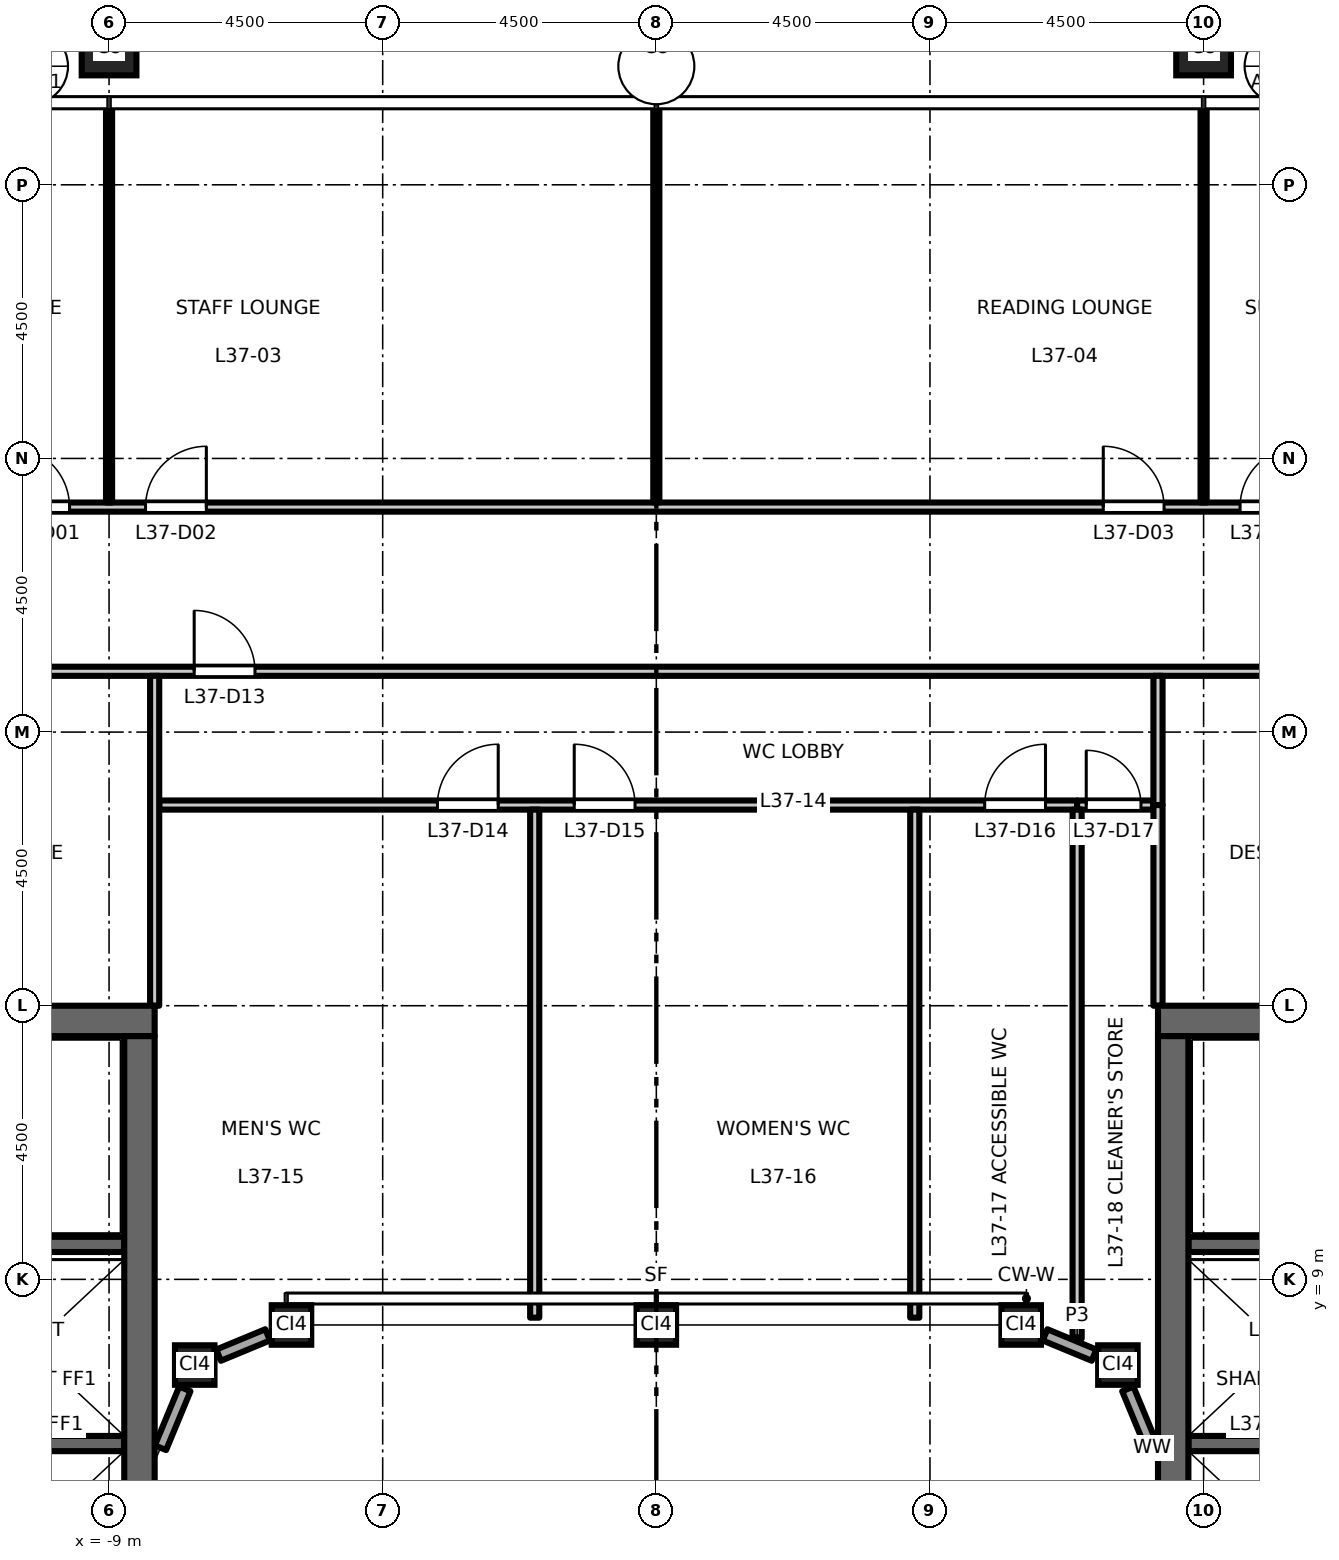
"""IFC4 building model, lengths in metres.
Left out: names, types, materials, properties, quantities, classifications, styles, units other than length and angle.
Written with IfcOpenShell. Run it as: python <this file> out.ifc"""

import sys

from ifc_helpers import new_model, si_unit, direction, frame, frame_2d, origin, origin_2d, place, context, subcontext, project, spatial, rectangle, hollow_rectangle, extrude, element, fill, save


model = new_model("IFC4")
c1 = context("Model", 3, precision=1e-05, world=origin(), true_north=direction((0.0, 1.0)))
c2 = subcontext(c1, "Body", "Model", "MODEL_VIEW")
j1 = project(units=[si_unit("LENGTHUNIT", "METRE"), si_unit("PLANEANGLEUNIT", "RADIAN")], contexts=[c1])
p1 = place(None, origin())
s1 = spatial("IfcSite", under=j1, at=p1, CompositionType="ELEMENT")
p2 = place(p1, origin())
s2 = spatial("IfcBuilding", under=s1, at=p2, CompositionType="ELEMENT")
p3 = place(p2, frame((0.0, 0.0, 172.2)))
s3 = spatial("IfcBuildingStorey", under=s2, at=p3, CompositionType="ELEMENT", Elevation=172.2)
for number, where, z_axis, x_axis in (
    (1, (9.0, 29.25, 0.0), (0.0, 0.0, 1.0), (1.0, 0.0, 0.0)),
    (2, (0.0, 29.25, 0.0), (0.0, 0.0, 1.0), (1.0, 0.0, 0.0)),
    (3, (-9.0, 29.25, 0.0), (0.0, 0.0, 1.0), (1.0, 0.0, 0.0)),
):
    element("IfcColumn", number, at=place(p3, frame(where, z_axis=z_axis, x_axis=x_axis)), inside=s3, PredefinedType="COLUMN", context=c2, shape_type="SweptSolid", body=[
        extrude(hollow_rectangle(XDim=0.9, YDim=0.9, WallThickness=0.05, at=origin_2d()), origin(), (0.0, 0.0, 1.0), 4.5),
    ])
for number, where, z_axis, x_axis in (
    (4, (-7.591, 7.591, 0.0), (0.0, 0.0, 1.0), (1.0, 0.0, 0.0)),
    (5, (-6.0, 8.25, 0.0), (0.0, 0.0, 1.0), (1.0, 0.0, 0.0)),
    (6, (0.0, 8.25, 0.0), (0.0, 0.0, 1.0), (1.0, 0.0, 0.0)),
    (7, (6.0, 8.25, 0.0), (0.0, 0.0, 1.0), (1.0, 0.0, 0.0)),
    (8, (7.591, 7.591, 0.0), (0.0, 0.0, 1.0), (1.0, 0.0, 0.0)),
):
    element("IfcColumn", number, at=place(p3, frame(where, z_axis=z_axis, x_axis=x_axis)), inside=s3, PredefinedType="COLUMN", context=c2, shape_type="SweptSolid", body=[
        extrude(hollow_rectangle(XDim=0.65, YDim=0.65, WallThickness=0.036, at=origin_2d()), origin(), (0.0, 0.0, 1.0), 4.5),
    ])
p4 = place(p3, frame((-8.75, 6.3, 0.0), z_axis=(0.0, 0.0, 1.0), x_axis=(-1.0, 0.0, 0.0)))
e9 = element("IfcWall", 9, at=p4, inside=s3, PredefinedType="SHEAR", context=c2, shape_type="SweptSolid", body=[
    extrude(rectangle(XDim=3.1, YDim=0.25, at=frame_2d((1.55, 0.0))), origin(), (0.0, 0.0, 1.0), 4.35),
])
p5 = place(p3, frame((-8.75, 9.575, 0.0), z_axis=(0.0, 0.0, 1.0), x_axis=(-1.0, 0.0, 0.0)))
e10 = element("IfcWall", 10, at=p5, inside=s3, PredefinedType="SHEAR", context=c2, shape_type="SweptSolid", body=[
    extrude(rectangle(XDim=8.0, YDim=0.25, at=frame_2d((4.0, 0.0))), origin(), (0.0, 0.0, 1.0), 4.35),
])
p6 = place(p5, frame((6.65, 0.0, 0.0)))
e11 = element("IfcOpeningElement", 11, at=p6, cuts=e10, PredefinedType="OPENING", context=c2, shape_type="SweptSolid", body=[
    extrude(rectangle(XDim=1.1, YDim=2.1, at=frame_2d((0.55, 1.05))), frame((0.0, 0.135, 0.0), z_axis=(0.0, -1.0, 0.0), x_axis=(1.0, 0.0, 0.0)), (0.0, 0.0, 1.0), 0.27),
])
p7 = place(p3, frame((-8.25, 13.25, 0.0), z_axis=(0.0, 0.0, 1.0), x_axis=(-1.0, 0.0, 0.0)))
e12 = element("IfcWall", 12, at=p7, inside=s3, PredefinedType="SHEAR", context=c2, shape_type="SweptSolid", body=[
    extrude(rectangle(XDim=13.5, YDim=0.5, at=frame_2d((6.75, 0.0))), origin(), (0.0, 0.0, 1.0), 4.35),
])
p8 = place(p3, frame((-8.5, -13.0, 0.0), z_axis=(0.0, 0.0, 1.0), x_axis=(0.0, 1.0, 0.0)))
e13 = element("IfcWall", 13, at=p8, inside=s3, PredefinedType="SHEAR", context=c2, shape_type="SweptSolid", body=[
    extrude(rectangle(XDim=26.0, YDim=0.5, at=frame_2d((13.0, 0.0))), origin(), (0.0, 0.0, 1.0), 4.35),
])
p9 = place(p3, frame((8.75, 6.3, 0.0), z_axis=(0.0, 0.0, 1.0), x_axis=(1.0, 0.0, 0.0)))
e14 = element("IfcWall", 14, at=p9, inside=s3, PredefinedType="SHEAR", context=c2, shape_type="SweptSolid", body=[
    extrude(rectangle(XDim=3.1, YDim=0.25, at=frame_2d((1.55, 0.0))), origin(), (0.0, 0.0, 1.0), 4.35),
])
p10 = place(p3, frame((8.75, 9.575, 0.0), z_axis=(0.0, 0.0, 1.0), x_axis=(1.0, 0.0, 0.0)))
e15 = element("IfcWall", 15, at=p10, inside=s3, PredefinedType="SHEAR", context=c2, shape_type="SweptSolid", body=[
    extrude(rectangle(XDim=8.0, YDim=0.25, at=frame_2d((4.0, 0.0))), origin(), (0.0, 0.0, 1.0), 4.35),
])
p11 = place(p10, frame((6.65, 0.0, 0.0)))
e16 = element("IfcOpeningElement", 16, at=p11, cuts=e15, PredefinedType="OPENING", context=c2, shape_type="SweptSolid", body=[
    extrude(rectangle(XDim=1.1, YDim=2.1, at=frame_2d((0.55, 1.05))), frame((0.0, 0.135, 0.0), z_axis=(0.0, -1.0, 0.0), x_axis=(1.0, 0.0, 0.0)), (0.0, 0.0, 1.0), 0.27),
])
p12 = place(p3, frame((8.25, 13.25, 0.0), z_axis=(0.0, 0.0, 1.0), x_axis=(1.0, 0.0, 0.0)))
e17 = element("IfcWall", 17, at=p12, inside=s3, PredefinedType="SHEAR", context=c2, shape_type="SweptSolid", body=[
    extrude(rectangle(XDim=13.5, YDim=0.5, at=frame_2d((6.75, 0.0))), origin(), (0.0, 0.0, 1.0), 4.35),
])
p13 = place(p3, frame((8.5, -13.0, 0.0), z_axis=(0.0, 0.0, 1.0), x_axis=(0.0, 1.0, 0.0)))
e18 = element("IfcWall", 18, at=p13, inside=s3, PredefinedType="SHEAR", context=c2, shape_type="SweptSolid", body=[
    extrude(rectangle(XDim=26.0, YDim=0.5, at=frame_2d((13.0, 0.0))), origin(), (0.0, 0.0, 1.0), 4.35),
])
p14 = place(p3, frame((8.154, 6.231, 0.0), z_axis=(0.0, 0.0, 1.0), x_axis=(-0.382694858887, 0.923874799408, 0.0)))
e19 = element("IfcWall", 19, at=p14, inside=s3, PredefinedType="STANDARD", context=c2, shape_type="SweptSolid", body=[
    extrude(rectangle(XDim=1.048, YDim=0.2, at=frame_2d((0.524, 0.0))), origin(), (0.0, 0.0, 1.0), 3.826),
])
for number, where, z_axis, x_axis in (
    (20, (7.199, 7.753, 0.0), (0.0, 0.0, 1.0), (-0.924, 0.383, 0.0)),
    (21, (-6.392, 8.087, 0.0), (0.0, 0.0, 1.0), (-0.924, -0.383, 0.0)),
):
    element("IfcWall", number, at=place(p3, frame(where, z_axis=z_axis, x_axis=x_axis)), inside=s3, PredefinedType="STANDARD", context=c2, shape_type="SweptSolid", body=[
        extrude(rectangle(XDim=0.873, YDim=0.2, at=frame_2d((0.437, 0.0))), origin(), (0.0, 0.0, 1.0), 3.826),
    ])
p15 = place(p3, frame((-7.753, 7.199, 0.0), z_axis=(0.0, 0.0, 1.0), x_axis=(-0.382694858887, -0.923874799408, 0.0)))
e22 = element("IfcWall", 22, at=p15, inside=s3, PredefinedType="STANDARD", context=c2, shape_type="SweptSolid", body=[
    extrude(rectangle(XDim=1.048, YDim=0.2, at=frame_2d((0.524, 0.0))), origin(), (0.0, 0.0, 1.0), 3.826),
])
p16 = place(p3, frame((-8.175, 16.8, 0.0), z_axis=(0.0, 0.0, 1.0), x_axis=(1.0, 0.0, 0.0)))
e23 = element("IfcWall", 23, at=p16, inside=s3, PredefinedType="PARTITIONING", context=c2, shape_type="SweptSolid", body=[
    extrude(rectangle(XDim=15.095, YDim=0.15, at=frame_2d((7.547, 0.0))), origin(), (0.0, 0.0, 1.0), 4.35),
])
p17 = place(p16, frame((4.575, 0.0, 0.0)))
e24 = element("IfcOpeningElement", 24, at=p17, cuts=e23, PredefinedType="OPENING", context=c2, shape_type="SweptSolid", body=[
    extrude(rectangle(XDim=1.0, YDim=2.1, at=frame_2d((0.5, 1.05))), frame((0.0, 0.085, 0.0), z_axis=(0.0, -1.0, 0.0), x_axis=(1.0, 0.0, 0.0)), (0.0, 0.0, 1.0), 0.17),
])
p18 = place(p16, frame((6.825, 0.0, 0.0)))
e25 = element("IfcOpeningElement", 25, at=p18, cuts=e23, PredefinedType="OPENING", context=c2, shape_type="SweptSolid", body=[
    extrude(rectangle(XDim=1.0, YDim=2.1, at=frame_2d((0.5, 1.05))), frame((0.0, 0.085, 0.0), z_axis=(0.0, -1.0, 0.0), x_axis=(1.0, 0.0, 0.0)), (0.0, 0.0, 1.0), 0.17),
])
p19 = place(p16, frame((13.575, 0.0, 0.0)))
e26 = element("IfcOpeningElement", 26, at=p19, cuts=e23, PredefinedType="OPENING", context=c2, shape_type="SweptSolid", body=[
    extrude(rectangle(XDim=1.0, YDim=2.1, at=frame_2d((0.5, 1.05))), frame((0.0, 0.085, 0.0), z_axis=(0.0, -1.0, 0.0), x_axis=(1.0, 0.0, 0.0)), (0.0, 0.0, 1.0), 0.17),
])
p20 = place(p3, frame((6.92, 16.8, 0.0), z_axis=(0.0, 0.0, 1.0), x_axis=(1.0, 0.0, 0.0)))
e27 = element("IfcWall", 27, at=p20, inside=s3, PredefinedType="PARTITIONING", context=c2, shape_type="SweptSolid", body=[
    extrude(rectangle(XDim=1.255, YDim=0.15, at=frame_2d((0.627, 0.0))), origin(), (0.0, 0.0, 1.0), 4.35),
])
p21 = place(p20, frame((0.15, 0.0, 0.0)))
e28 = element("IfcOpeningElement", 28, at=p21, cuts=e27, PredefinedType="OPENING", context=c2, shape_type="SweptSolid", body=[
    extrude(rectangle(XDim=0.9, YDim=2.1, at=frame_2d((0.45, 1.05))), frame((0.0, 0.085, 0.0), z_axis=(0.0, -1.0, 0.0), x_axis=(1.0, 0.0, 0.0)), (0.0, 0.0, 1.0), 0.17),
])
p22 = place(p3, frame((-21.825, 19.0, 0.0), z_axis=(0.0, 0.0, 1.0), x_axis=(1.0, 0.0, 0.0)))
e29 = element("IfcWall", 29, at=p22, inside=s3, PredefinedType="PARTITIONING", context=c2, shape_type="SweptSolid", body=[
    extrude(rectangle(XDim=43.65, YDim=0.15, at=frame_2d((21.825, 0.0))), origin(), (0.0, 0.0, 1.0), 4.35),
])
p23 = place(p22, frame((14.225, 0.0, 0.0)))
e30 = element("IfcOpeningElement", 30, at=p23, cuts=e29, PredefinedType="OPENING", context=c2, shape_type="SweptSolid", body=[
    extrude(rectangle(XDim=1.0, YDim=2.1, at=frame_2d((0.5, 1.05))), frame((0.0, 0.085, 0.0), z_axis=(0.0, -1.0, 0.0), x_axis=(1.0, 0.0, 0.0)), (0.0, 0.0, 1.0), 0.17),
])
p24 = place(p22, frame((0.725, 0.0, 0.0)))
e31 = element("IfcOpeningElement", 31, at=p24, cuts=e29, PredefinedType="OPENING", context=c2, shape_type="SweptSolid", body=[
    extrude(rectangle(XDim=1.0, YDim=2.1, at=frame_2d((0.5, 1.05))), frame((0.0, 0.085, 0.0), z_axis=(0.0, -1.0, 0.0), x_axis=(1.0, 0.0, 0.0)), (0.0, 0.0, 1.0), 0.17),
])
p25 = place(p22, frame((41.975, 0.0, 0.0)))
e32 = element("IfcOpeningElement", 32, at=p25, cuts=e29, PredefinedType="OPENING", context=c2, shape_type="SweptSolid", body=[
    extrude(rectangle(XDim=1.0, YDim=2.1, at=frame_2d((0.5, 1.05))), frame((0.0, 0.085, 0.0), z_axis=(0.0, -1.0, 0.0), x_axis=(1.0, 0.0, 0.0)), (0.0, 0.0, 1.0), 0.17),
])
p26 = place(p3, frame((-26.646, 21.7, 0.0), z_axis=(0.0, 0.0, 1.0), x_axis=(1.0, 0.0, 0.0)))
e33 = element("IfcWall", 33, at=p26, inside=s3, PredefinedType="PARTITIONING", context=c2, shape_type="SweptSolid", body=[
    extrude(rectangle(XDim=53.292, YDim=0.15, at=frame_2d((26.646, 0.0))), origin(), (0.0, 0.0, 1.0), 4.35),
])
p27 = place(p26, frame((15.996, 0.0, 0.0)))
e34 = element("IfcOpeningElement", 34, at=p27, cuts=e33, PredefinedType="OPENING", context=c2, shape_type="SweptSolid", body=[
    extrude(rectangle(XDim=1.0, YDim=2.1, at=frame_2d((0.5, 1.05))), frame((0.0, 0.085, 0.0), z_axis=(0.0, -1.0, 0.0), x_axis=(1.0, 0.0, 0.0)), (0.0, 0.0, 1.0), 0.17),
])
p28 = place(p26, frame((18.246, 0.0, 0.0)))
e35 = element("IfcOpeningElement", 35, at=p28, cuts=e33, PredefinedType="OPENING", context=c2, shape_type="SweptSolid", body=[
    extrude(rectangle(XDim=1.0, YDim=2.1, at=frame_2d((0.5, 1.05))), frame((0.0, 0.085, 0.0), z_axis=(0.0, -1.0, 0.0), x_axis=(1.0, 0.0, 0.0)), (0.0, 0.0, 1.0), 0.17),
])
p29 = place(p26, frame((33.996, 0.0, 0.0)))
e36 = element("IfcOpeningElement", 36, at=p29, cuts=e33, PredefinedType="OPENING", context=c2, shape_type="SweptSolid", body=[
    extrude(rectangle(XDim=1.0, YDim=2.1, at=frame_2d((0.5, 1.05))), frame((0.0, 0.085, 0.0), z_axis=(0.0, -1.0, 0.0), x_axis=(1.0, 0.0, 0.0)), (0.0, 0.0, 1.0), 0.17),
])
p30 = place(p26, frame((36.246, 0.0, 0.0)))
e37 = element("IfcOpeningElement", 37, at=p30, cuts=e33, PredefinedType="OPENING", context=c2, shape_type="SweptSolid", body=[
    extrude(rectangle(XDim=1.0, YDim=2.1, at=frame_2d((0.5, 1.05))), frame((0.0, 0.085, 0.0), z_axis=(0.0, -1.0, 0.0), x_axis=(1.0, 0.0, 0.0)), (0.0, 0.0, 1.0), 0.17),
])
p31 = place(p26, frame((6.996, 0.0, 0.0)))
e38 = element("IfcOpeningElement", 38, at=p31, cuts=e33, PredefinedType="OPENING", context=c2, shape_type="SweptSolid", body=[
    extrude(rectangle(XDim=1.0, YDim=2.1, at=frame_2d((0.5, 1.05))), frame((0.0, 0.085, 0.0), z_axis=(0.0, -1.0, 0.0), x_axis=(1.0, 0.0, 0.0)), (0.0, 0.0, 1.0), 0.17),
])
p32 = place(p26, frame((45.142, 0.0, 0.0)))
e39 = element("IfcOpeningElement", 39, at=p32, cuts=e33, PredefinedType="OPENING", context=c2, shape_type="SweptSolid", body=[
    extrude(rectangle(XDim=1.0, YDim=2.1, at=frame_2d((0.5, 1.05))), frame((0.0, 0.085, 0.0), z_axis=(0.0, -1.0, 0.0), x_axis=(1.0, 0.0, 0.0)), (0.0, 0.0, 1.0), 0.17),
])
p33 = place(p3, frame((-9.0, 21.775, 0.0), z_axis=(0.0, 0.0, 1.0), x_axis=(0.0, 1.0, 0.0)))
e40 = element("IfcWall", 40, at=p33, inside=s3, PredefinedType="PARTITIONING", context=c2, shape_type="SweptSolid", body=[
    extrude(rectangle(XDim=6.485, YDim=0.1, at=frame_2d((3.243, 0.0))), origin(), (0.0, 0.0, 1.0), 3.45),
])
p34 = place(p3, frame((-8.25, 13.5, 0.0), z_axis=(0.0, 0.0, 1.0), x_axis=(0.0, 1.0, 0.0)))
e41 = element("IfcWall", 41, at=p34, inside=s3, PredefinedType="PARTITIONING", context=c2, shape_type="SweptSolid", body=[
    extrude(rectangle(XDim=5.425, YDim=0.15, at=frame_2d((2.712, 0.0))), origin(), (0.0, 0.0, 1.0), 4.35),
])
p35 = place(p3, frame((-2.0, 8.37, 0.0), z_axis=(0.0, 0.0, 1.0), x_axis=(0.0, 1.0, 0.0)))
e42 = element("IfcWall", 42, at=p35, inside=s3, PredefinedType="PARTITIONING", context=c2, shape_type="SweptSolid", body=[
    extrude(rectangle(XDim=8.355, YDim=0.15, at=frame_2d((4.177, 0.0))), origin(), (0.0, 0.0, 1.0), 4.35),
])
p36 = place(p3, frame((0.0, 21.775, 0.0), z_axis=(0.0, 0.0, 1.0), x_axis=(0.0, 1.0, 0.0)))
e43 = element("IfcWall", 43, at=p36, inside=s3, PredefinedType="PARTITIONING", context=c2, shape_type="SweptSolid", body=[
    extrude(rectangle(XDim=6.485, YDim=0.1, at=frame_2d((3.243, 0.0))), origin(), (0.0, 0.0, 1.0), 3.45),
])
p37 = place(p3, frame((4.25, 8.37, 0.0), z_axis=(0.0, 0.0, 1.0), x_axis=(0.0, 1.0, 0.0)))
e44 = element("IfcWall", 44, at=p37, inside=s3, PredefinedType="PARTITIONING", context=c2, shape_type="SweptSolid", body=[
    extrude(rectangle(XDim=8.355, YDim=0.15, at=frame_2d((4.177, 0.0))), origin(), (0.0, 0.0, 1.0), 4.35),
])
p38 = place(p3, frame((6.92, 8.025, 0.0), z_axis=(0.0, 0.0, 1.0), x_axis=(0.0, 1.0, 0.0)))
e45 = element("IfcWall", 45, at=p38, inside=s3, PredefinedType="PARTITIONING", context=c2, shape_type="SweptSolid", body=[
    extrude(rectangle(XDim=8.7, YDim=0.15, at=frame_2d((4.35, 0.0))), origin(), (0.0, 0.0, 1.0), 4.35),
])
p39 = place(p3, frame((8.25, 16.8, 0.0), z_axis=(0.0, 0.0, 1.0), x_axis=(0.0, 1.0, 0.0)))
e46 = element("IfcWall", 46, at=p39, inside=s3, PredefinedType="PARTITIONING", context=c2, shape_type="SweptSolid", body=[
    extrude(rectangle(XDim=2.125, YDim=0.15, at=frame_2d((1.062, 0.0))), origin(), (0.0, 0.0, 1.0), 4.35),
])
p40 = place(p3, frame((8.25, 13.5, 0.0), z_axis=(0.0, 0.0, 1.0), x_axis=(0.0, 1.0, 0.0)))
e47 = element("IfcWall", 47, at=p40, inside=s3, PredefinedType="PARTITIONING", context=c2, shape_type="SweptSolid", body=[
    extrude(rectangle(XDim=3.3, YDim=0.15, at=frame_2d((1.65, 0.0))), origin(), (0.0, 0.0, 1.0), 4.35),
])
p41 = place(p3, frame((9.0, 21.775, 0.0), z_axis=(0.0, 0.0, 1.0), x_axis=(0.0, 1.0, 0.0)))
e48 = element("IfcWall", 48, at=p41, inside=s3, PredefinedType="PARTITIONING", context=c2, shape_type="SweptSolid", body=[
    extrude(rectangle(XDim=6.485, YDim=0.1, at=frame_2d((3.243, 0.0))), origin(), (0.0, 0.0, 1.0), 3.45),
])
p42 = place(p27, origin())
e49 = element("IfcDoor", 49, at=p42, inside=s3, OperationType="SINGLE_SWING_LEFT", PredefinedType="DOOR", context=c2, shape_type="SweptSolid", body=[
    extrude(rectangle(XDim=1.0, YDim=2.1, at=frame_2d((0.5, 1.05))), frame((0.0, 0.025, 0.0), z_axis=(0.0, -1.0, 0.0), x_axis=(1.0, 0.0, 0.0)), (0.0, 0.0, 1.0), 0.05),
])
fill(e34, e49)
p43 = place(p28, origin())
e50 = element("IfcDoor", 50, at=p43, inside=s3, OperationType="SINGLE_SWING_RIGHT", PredefinedType="DOOR", context=c2, shape_type="SweptSolid", body=[
    extrude(rectangle(XDim=1.0, YDim=2.1, at=frame_2d((0.5, 1.05))), frame((0.0, 0.025, 0.0), z_axis=(0.0, -1.0, 0.0), x_axis=(1.0, 0.0, 0.0)), (0.0, 0.0, 1.0), 0.05),
])
fill(e35, e50)
p44 = place(p29, origin())
e51 = element("IfcDoor", 51, at=p44, inside=s3, OperationType="SINGLE_SWING_LEFT", PredefinedType="DOOR", context=c2, shape_type="SweptSolid", body=[
    extrude(rectangle(XDim=1.0, YDim=2.1, at=frame_2d((0.5, 1.05))), frame((0.0, 0.025, 0.0), z_axis=(0.0, -1.0, 0.0), x_axis=(1.0, 0.0, 0.0)), (0.0, 0.0, 1.0), 0.05),
])
fill(e36, e51)
p45 = place(p30, origin())
e52 = element("IfcDoor", 52, at=p45, inside=s3, OperationType="SINGLE_SWING_RIGHT", PredefinedType="DOOR", context=c2, shape_type="SweptSolid", body=[
    extrude(rectangle(XDim=1.0, YDim=2.1, at=frame_2d((0.5, 1.05))), frame((0.0, 0.025, 0.0), z_axis=(0.0, -1.0, 0.0), x_axis=(1.0, 0.0, 0.0)), (0.0, 0.0, 1.0), 0.05),
])
fill(e37, e52)
p46 = place(p23, origin())
e53 = element("IfcDoor", 53, at=p46, inside=s3, OperationType="SINGLE_SWING_LEFT", PredefinedType="DOOR", context=c2, shape_type="SweptSolid", body=[
    extrude(rectangle(XDim=1.0, YDim=2.1, at=frame_2d((0.5, 1.05))), frame((0.0, 0.025, 0.0), z_axis=(0.0, -1.0, 0.0), x_axis=(1.0, 0.0, 0.0)), (0.0, 0.0, 1.0), 0.05),
])
fill(e30, e53)
p47 = place(p17, origin())
e54 = element("IfcDoor", 54, at=p47, inside=s3, OperationType="SINGLE_SWING_RIGHT", PredefinedType="DOOR", context=c2, shape_type="SweptSolid", body=[
    extrude(rectangle(XDim=1.0, YDim=2.1, at=frame_2d((0.5, 1.05))), frame((0.0, 0.025, 0.0), z_axis=(0.0, -1.0, 0.0), x_axis=(1.0, 0.0, 0.0)), (0.0, 0.0, 1.0), 0.05),
])
fill(e24, e54)
p48 = place(p18, origin())
e55 = element("IfcDoor", 55, at=p48, inside=s3, OperationType="SINGLE_SWING_LEFT", PredefinedType="DOOR", context=c2, shape_type="SweptSolid", body=[
    extrude(rectangle(XDim=1.0, YDim=2.1, at=frame_2d((0.5, 1.05))), frame((0.0, 0.025, 0.0), z_axis=(0.0, -1.0, 0.0), x_axis=(1.0, 0.0, 0.0)), (0.0, 0.0, 1.0), 0.05),
])
fill(e25, e55)
p49 = place(p19, origin())
e56 = element("IfcDoor", 56, at=p49, inside=s3, OperationType="SINGLE_SWING_RIGHT", PredefinedType="DOOR", context=c2, shape_type="SweptSolid", body=[
    extrude(rectangle(XDim=1.0, YDim=2.1, at=frame_2d((0.5, 1.05))), frame((0.0, 0.025, 0.0), z_axis=(0.0, -1.0, 0.0), x_axis=(1.0, 0.0, 0.0)), (0.0, 0.0, 1.0), 0.05),
])
fill(e26, e56)
p50 = place(p21, origin())
e57 = element("IfcDoor", 57, at=p50, inside=s3, OperationType="SINGLE_SWING_LEFT", PredefinedType="DOOR", context=c2, shape_type="SweptSolid", body=[
    extrude(rectangle(XDim=0.9, YDim=2.1, at=frame_2d((0.45, 1.05))), frame((0.0, 0.025, 0.0), z_axis=(0.0, -1.0, 0.0), x_axis=(1.0, 0.0, 0.0)), (0.0, 0.0, 1.0), 0.05),
])
fill(e28, e57)
save(model, sys.argv[1])
